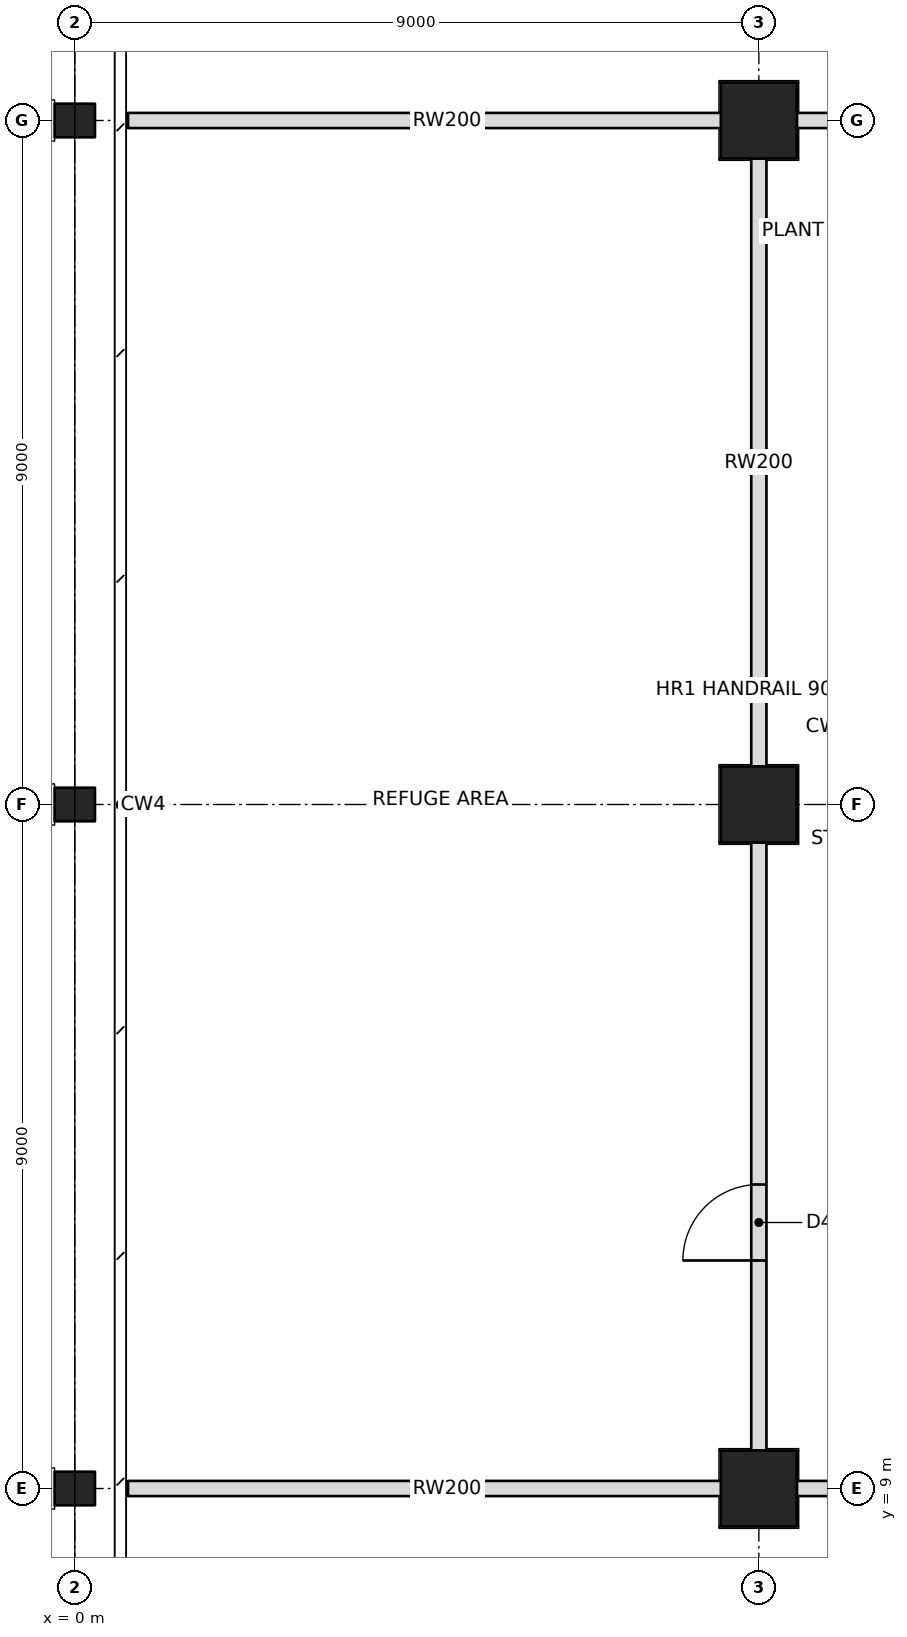
"""IFC4 building model, lengths in metres.
Left out: names, types, materials, properties, quantities, classifications, styles, units other than length and angle.
Written with IfcOpenShell. Run it as: python <this file> out.ifc"""

import sys

from ifc_helpers import new_model, si_unit, direction, frame, frame_2d, origin, origin_2d, place, context, subcontext, project, spatial, rectangle, hollow_rectangle, i_section, extrude, element, fill, save


model = new_model("IFC4")
c1 = context("Model", 3, precision=1e-05, world=origin(), true_north=direction((0.0, 1.0)))
c2 = subcontext(c1, "Body", "Model", "MODEL_VIEW")
j1 = project(units=[si_unit("LENGTHUNIT", "METRE"), si_unit("PLANEANGLEUNIT", "RADIAN")], contexts=[c1])
p1 = place(None, origin())
s1 = spatial("IfcSite", under=j1, at=p1, CompositionType="ELEMENT")
p2 = place(p1, origin())
s2 = spatial("IfcBuilding", under=s1, at=p2, CompositionType="ELEMENT")
p3 = place(p2, frame((0.0, 0.0, 155.4)))
s3 = spatial("IfcBuildingStorey", under=s2, at=p3, CompositionType="ELEMENT", Elevation=155.4)
for number, where, z_axis, x_axis in (
    (1, (0.0, 9.0, 0.0), (0.0, 0.0, 1.0), (0.0, 1.0, 0.0)),
    (2, (0.0, 18.0, 0.0), (0.0, 0.0, 1.0), (0.0, 1.0, 0.0)),
    (3, (0.0, 27.0, 0.0), (0.0, 0.0, 1.0), (0.0, 1.0, 0.0)),
):
    element("IfcColumn", number, at=place(p3, frame(where, z_axis=z_axis, x_axis=x_axis)), inside=s3, PredefinedType="COLUMN", context=c2, shape_type="SweptSolid", body=[
        extrude(i_section(OverallWidth=0.442, OverallDepth=0.531, WebThickness=0.066, FlangeThickness=0.106, at=origin_2d()), origin(), (0.0, 0.0, 1.0), 5.0),
    ])
for number, where, z_axis, x_axis in (
    (4, (9.0, 9.0, 0.0), (0.0, 0.0, 1.0), (1.0, 0.0, 0.0)),
    (5, (9.0, 18.0, 0.0), (0.0, 0.0, 1.0), (1.0, 0.0, 0.0)),
    (6, (9.0, 27.0, 0.0), (0.0, 0.0, 1.0), (1.0, 0.0, 0.0)),
):
    element("IfcColumn", number, at=place(p3, frame(where, z_axis=z_axis, x_axis=x_axis)), inside=s3, PredefinedType="COLUMN", context=c2, shape_type="SweptSolid", body=[
        extrude(hollow_rectangle(XDim=1.0, YDim=1.0, WallThickness=0.1, at=origin_2d()), origin(), (0.0, 0.0, 1.0), 5.0),
    ])
p4 = place(p3, frame((9.0, 9.5, 0.0), z_axis=(0.0, 0.0, 1.0), x_axis=(0.0, 1.0, 0.0)))
e7 = element("IfcWall", 7, at=p4, inside=s3, PredefinedType="PARTITIONING", context=c2, shape_type="SweptSolid", body=[
    extrude(rectangle(XDim=8.0, YDim=0.2, at=frame_2d((4.0, 0.0))), origin(), (0.0, 0.0, 1.0), 4.005),
])
p5 = place(p4, frame((2.5, 0.0, 0.0)))
e8 = element("IfcOpeningElement", 8, at=p5, cuts=e7, PredefinedType="OPENING", context=c2, shape_type="SweptSolid", body=[
    extrude(rectangle(XDim=1.0, YDim=2.1, at=frame_2d((0.5, 1.05))), frame((0.0, 0.11, 0.0), z_axis=(0.0, -1.0, 0.0), x_axis=(1.0, 0.0, 0.0)), (0.0, 0.0, 1.0), 0.22),
])
p6 = place(p3, frame((9.0, 18.5, 0.0), z_axis=(0.0, 0.0, 1.0), x_axis=(0.0, 1.0, 0.0)))
e9 = element("IfcWall", 9, at=p6, inside=s3, PredefinedType="PARTITIONING", context=c2, shape_type="SweptSolid", body=[
    extrude(rectangle(XDim=8.0, YDim=0.2, at=frame_2d((4.0, 0.0))), origin(), (0.0, 0.0, 1.0), 4.005),
])
for number, where, z_axis, x_axis in (
    (10, (0.7, 9.0, 0.0), (0.0, 0.0, 1.0), (1.0, 0.0, 0.0)),
    (11, (0.7, 27.0, 0.0), (0.0, 0.0, 1.0), (1.0, 0.0, 0.0)),
):
    element("IfcWall", number, at=place(p3, frame(where, z_axis=z_axis, x_axis=x_axis)), inside=s3, PredefinedType="PARTITIONING", context=c2, shape_type="SweptSolid", body=[
        extrude(rectangle(XDim=8.4, YDim=0.2, at=frame_2d((4.2, 0.0))), origin(), (0.0, 0.0, 1.0), 4.005),
    ])
p7 = place(p3, frame((9.5, 9.0, 0.0), z_axis=(0.0, 0.0, 1.0), x_axis=(1.0, 0.0, 0.0)))
e12 = element("IfcWall", 12, at=p7, inside=s3, PredefinedType="PARTITIONING", context=c2, shape_type="SweptSolid", body=[
    extrude(rectangle(XDim=8.0, YDim=0.2, at=frame_2d((4.0, 0.0))), origin(), (0.0, 0.0, 1.0), 4.005),
])
p8 = place(p7, frame((1.5, 0.0, 0.0)))
e13 = element("IfcOpeningElement", 13, at=p8, cuts=e12, PredefinedType="OPENING", context=c2, shape_type="SweptSolid", body=[
    extrude(rectangle(XDim=1.0, YDim=2.1, at=frame_2d((0.5, 1.05))), frame((0.0, 0.11, 0.0), z_axis=(0.0, -1.0, 0.0), x_axis=(1.0, 0.0, 0.0)), (0.0, 0.0, 1.0), 0.22),
])
p9 = place(p3, frame((9.5, 27.0, 0.0), z_axis=(0.0, 0.0, 1.0), x_axis=(1.0, 0.0, 0.0)))
e14 = element("IfcWall", 14, at=p9, inside=s3, PredefinedType="PARTITIONING", context=c2, shape_type="SweptSolid", body=[
    extrude(rectangle(XDim=8.0, YDim=0.2, at=frame_2d((4.0, 0.0))), origin(), (0.0, 0.0, 1.0), 4.005),
])
p10 = place(p9, frame((1.5, 0.0, 0.0)))
e15 = element("IfcOpeningElement", 15, at=p10, cuts=e14, PredefinedType="OPENING", context=c2, shape_type="SweptSolid", body=[
    extrude(rectangle(XDim=1.0, YDim=2.1, at=frame_2d((0.5, 1.05))), frame((0.0, 0.11, 0.0), z_axis=(0.0, -1.0, 0.0), x_axis=(1.0, 0.0, 0.0)), (0.0, 0.0, 1.0), 0.22),
])
p11 = place(p5, origin())
e16 = element("IfcDoor", 16, at=p11, inside=s3, OperationType="SINGLE_SWING_LEFT", PredefinedType="DOOR", context=c2, shape_type="SweptSolid", body=[
    extrude(rectangle(XDim=1.0, YDim=2.1, at=frame_2d((0.5, 1.05))), frame((0.0, 0.025, 0.0), z_axis=(0.0, -1.0, 0.0), x_axis=(1.0, 0.0, 0.0)), (0.0, 0.0, 1.0), 0.05),
])
fill(e8, e16)
save(model, sys.argv[1])
